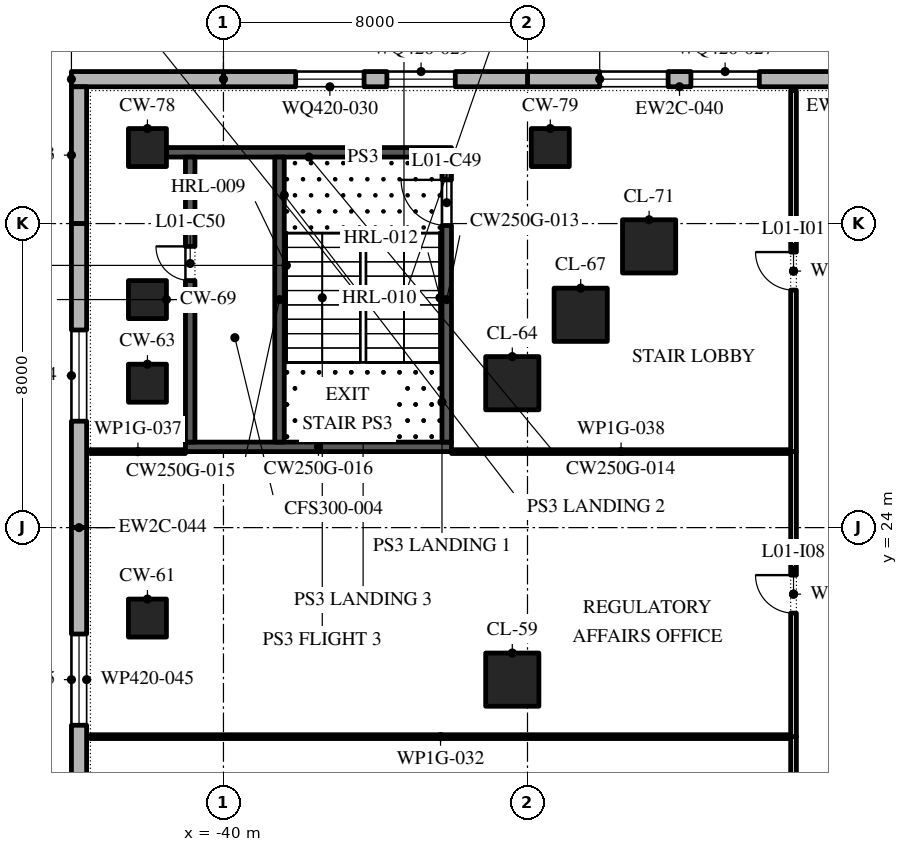
"""IFC4 building model, lengths in metres.
Left out: names, types, materials, properties, quantities, classifications, styles, units other than length and angle.
Written with IfcOpenShell. Run it as: python <this file> out.ifc"""

import sys

from ifc_helpers import new_model, si_unit, direction, frame, frame_2d, origin, origin_2d, place, context, subcontext, project, spatial, polyline, rectangle, outline, extrude, element, fill, save


model = new_model("IFC4")
c1 = context("Model", 3, precision=1e-05, world=origin(), true_north=direction((0.0, 1.0)))
c2 = subcontext(c1, "Body", "Model", "MODEL_VIEW")
j1 = project(units=[si_unit("LENGTHUNIT", "METRE"), si_unit("PLANEANGLEUNIT", "RADIAN")], contexts=[c1])
p1 = place(None, origin())
s1 = spatial("IfcSite", under=j1, at=p1, CompositionType="ELEMENT")
p2 = place(p1, origin())
s2 = spatial("IfcBuilding", under=s1, at=p2, CompositionType="ELEMENT")
p3 = place(p2, frame((0.0, 0.0, 8.0)))
s3 = spatial("IfcBuildingStorey", under=s2, at=p3, CompositionType="ELEMENT", Elevation=8.0)
p4 = place(p3, frame((-32.4, 20.0, 0.0), z_axis=(0.0, 0.0, 1.0), x_axis=(1.0, 0.0, 0.0)))
e1 = element("IfcColumn", 1, at=p4, inside=s3, PredefinedType="COLUMN", context=c2, shape_type="SweptSolid", body=[
    extrude(rectangle(XDim=1.4, YDim=1.4, at=origin_2d()), origin(), (0.0, 0.0, 1.0), 6.0),
])
for number, where, z_axis, x_axis in (
    (2, (-42.0, 21.62, 0.0), (0.0, 0.0, 1.0), (1.0, 0.0, 0.0)),
    (3, (-42.0, 27.8, 0.0), (0.0, 0.0, 1.0), (1.0, 0.0, 0.0)),
):
    element("IfcColumn", number, at=place(p3, frame(where, z_axis=z_axis, x_axis=x_axis)), inside=s3, PredefinedType="COLUMN", context=c2, shape_type="SweptSolid", body=[
        extrude(rectangle(XDim=1.0, YDim=1.0, at=origin_2d()), origin(), (0.0, 0.0, 1.0), 6.0),
    ])
for number, where, z_axis, x_axis in (
    (4, (-32.4, 27.8, 0.0), (0.0, 0.0, 1.0), (1.0, 0.0, 0.0)),
    (5, (-30.6, 29.6, 0.0), (0.0, 0.0, 1.0), (1.0, 0.0, 0.0)),
):
    element("IfcColumn", number, at=place(p3, frame(where, z_axis=z_axis, x_axis=x_axis)), inside=s3, PredefinedType="COLUMN", context=c2, shape_type="SweptSolid", body=[
        extrude(rectangle(XDim=1.4, YDim=1.4, at=origin_2d()), origin(), (0.0, 0.0, 1.0), 6.0),
    ])
p5 = place(p3, frame((-42.0, 30.0, 0.0), z_axis=(0.0, 0.0, 1.0), x_axis=(1.0, 0.0, 0.0)))
e6 = element("IfcColumn", 6, at=p5, inside=s3, PredefinedType="COLUMN", context=c2, shape_type="SweptSolid", body=[
    extrude(rectangle(XDim=1.0, YDim=1.0, at=origin_2d()), origin(), (0.0, 0.0, 1.0), 6.0),
])
p6 = place(p3, frame((-28.8, 31.4, 0.0), z_axis=(0.0, 0.0, 1.0), x_axis=(1.0, 0.0, 0.0)))
e7 = element("IfcColumn", 7, at=p6, inside=s3, PredefinedType="COLUMN", context=c2, shape_type="SweptSolid", body=[
    extrude(rectangle(XDim=1.4, YDim=1.4, at=origin_2d()), origin(), (0.0, 0.0, 1.0), 6.0),
])
for number, where, z_axis, x_axis in (
    (8, (-42.0, 34.0, 0.0), (0.0, 0.0, 1.0), (1.0, 0.0, 0.0)),
    (9, (-31.4, 34.0, 0.0), (0.0, 0.0, 1.0), (1.0, 0.0, 0.0)),
):
    element("IfcColumn", number, at=place(p3, frame(where, z_axis=z_axis, x_axis=x_axis)), inside=s3, PredefinedType="COLUMN", context=c2, shape_type="SweptSolid", body=[
        extrude(rectangle(XDim=1.0, YDim=1.0, at=origin_2d()), origin(), (0.0, 0.0, 1.0), 6.0),
    ])
p7 = place(p3, frame((-24.0, 35.8, 0.0), z_axis=(0.0, 0.0, 1.0), x_axis=(-1.0, 0.0, 0.0)))
e10 = element("IfcWall", 10, at=p7, inside=s3, PredefinedType="STANDARD", context=c2, shape_type="SweptSolid", body=[
    extrude(rectangle(XDim=8.0, YDim=0.4, at=frame_2d((4.0, 0.0))), origin(), (0.0, 0.0, 1.0), 5.7),
])
p8 = place(p7, frame((1.9, 0.0, 0.9)))
e11 = element("IfcOpeningElement", 11, at=p8, cuts=e10, PredefinedType="OPENING", context=c2, shape_type="SweptSolid", body=[
    extrude(outline(polyline([(0.0, 0.0), (1.8, 0.0), (1.8, 2.641), (1.785, 2.876), (1.739, 3.107), (1.663, 3.33), (1.559, 3.541), (1.428, 3.737), (1.273, 3.914), (1.096, 4.069), (0.9, 4.2), (0.704, 4.069), (0.527, 3.914), (0.372, 3.737), (0.241, 3.541), (0.137, 3.33), (0.061, 3.107), (0.015, 2.876), (0.0, 2.641), (0.0, 0.0)])), frame((0.0, 0.21, 0.0), z_axis=(0.0, -1.0, 0.0), x_axis=(1.0, 0.0, 0.0)), (0.0, 0.0, 1.0), 0.42),
])
p9 = place(p7, frame((4.3, 0.0, 0.9)))
e12 = element("IfcOpeningElement", 12, at=p9, cuts=e10, PredefinedType="OPENING", context=c2, shape_type="SweptSolid", body=[
    extrude(outline(polyline([(0.0, 0.0), (1.8, 0.0), (1.8, 2.641), (1.785, 2.876), (1.739, 3.107), (1.663, 3.33), (1.559, 3.541), (1.428, 3.737), (1.273, 3.914), (1.096, 4.069), (0.9, 4.2), (0.704, 4.069), (0.527, 3.914), (0.372, 3.737), (0.241, 3.541), (0.137, 3.33), (0.061, 3.107), (0.015, 2.876), (0.0, 2.641), (0.0, 0.0)])), frame((0.0, 0.21, 0.0), z_axis=(0.0, -1.0, 0.0), x_axis=(1.0, 0.0, 0.0)), (0.0, 0.0, 1.0), 0.42),
])
p10 = place(p3, frame((-32.0, 35.8, 0.0), z_axis=(0.0, 0.0, 1.0), x_axis=(-1.0, 0.0, 0.0)))
e13 = element("IfcWall", 13, at=p10, inside=s3, PredefinedType="STANDARD", context=c2, shape_type="SweptSolid", body=[
    extrude(rectangle(XDim=8.0, YDim=0.4, at=frame_2d((4.0, 0.0))), origin(), (0.0, 0.0, 1.0), 5.7),
])
p11 = place(p10, frame((1.9, 0.0, 0.9)))
e14 = element("IfcOpeningElement", 14, at=p11, cuts=e13, PredefinedType="OPENING", context=c2, shape_type="SweptSolid", body=[
    extrude(outline(polyline([(0.0, 0.0), (1.8, 0.0), (1.8, 2.641), (1.785, 2.876), (1.739, 3.107), (1.663, 3.33), (1.559, 3.541), (1.428, 3.737), (1.273, 3.914), (1.096, 4.069), (0.9, 4.2), (0.704, 4.069), (0.527, 3.914), (0.372, 3.737), (0.241, 3.541), (0.137, 3.33), (0.061, 3.107), (0.015, 2.876), (0.0, 2.641), (0.0, 0.0)])), frame((0.0, 0.21, 0.0), z_axis=(0.0, -1.0, 0.0), x_axis=(1.0, 0.0, 0.0)), (0.0, 0.0, 1.0), 0.42),
])
p12 = place(p10, frame((4.3, 0.0, 0.9)))
e15 = element("IfcOpeningElement", 15, at=p12, cuts=e13, PredefinedType="OPENING", context=c2, shape_type="SweptSolid", body=[
    extrude(outline(polyline([(0.0, 0.0), (1.8, 0.0), (1.8, 2.641), (1.785, 2.876), (1.739, 3.107), (1.663, 3.33), (1.559, 3.541), (1.428, 3.737), (1.273, 3.914), (1.096, 4.069), (0.9, 4.2), (0.704, 4.069), (0.527, 3.914), (0.372, 3.737), (0.241, 3.541), (0.137, 3.33), (0.061, 3.107), (0.015, 2.876), (0.0, 2.641), (0.0, 0.0)])), frame((0.0, 0.21, 0.0), z_axis=(0.0, -1.0, 0.0), x_axis=(1.0, 0.0, 0.0)), (0.0, 0.0, 1.0), 0.42),
])
p13 = place(p3, frame((-40.0, 35.8, 0.0), z_axis=(0.0, 0.0, 1.0), x_axis=(-1.0, 0.0, 0.0)))
e16 = element("IfcWall", 16, at=p13, inside=s3, PredefinedType="STANDARD", context=c2, shape_type="SweptSolid", body=[
    extrude(rectangle(XDim=4.0, YDim=0.4, at=frame_2d((2.0, 0.0))), origin(), (0.0, 0.0, 1.0), 5.7),
])
p14 = place(p3, frame((-43.8, 35.6, 0.0), z_axis=(0.0, 0.0, 1.0), x_axis=(0.0, -1.0, 0.0)))
e17 = element("IfcWall", 17, at=p14, inside=s3, PredefinedType="STANDARD", context=c2, shape_type="SweptSolid", body=[
    extrude(rectangle(XDim=3.6, YDim=0.4, at=frame_2d((1.8, 0.0))), origin(), (0.0, 0.0, 1.0), 5.7),
])
p15 = place(p3, frame((-43.8, 32.0, 0.0), z_axis=(0.0, 0.0, 1.0), x_axis=(0.0, -1.0, 0.0)))
e18 = element("IfcWall", 18, at=p15, inside=s3, PredefinedType="STANDARD", context=c2, shape_type="SweptSolid", body=[
    extrude(rectangle(XDim=8.0, YDim=0.4, at=frame_2d((4.0, 0.0))), origin(), (0.0, 0.0, 1.0), 5.7),
])
p16 = place(p15, frame((2.8, 0.0, 0.9)))
e19 = element("IfcOpeningElement", 19, at=p16, cuts=e18, PredefinedType="OPENING", context=c2, shape_type="SweptSolid", body=[
    extrude(outline(polyline([(0.0, 0.0), (2.4, 0.0), (2.4, 2.122), (2.379, 2.435), (2.318, 2.743), (2.217, 3.04), (2.078, 3.322), (1.904, 3.583), (1.697, 3.819), (1.461, 4.026), (1.2, 4.2), (0.939, 4.026), (0.703, 3.819), (0.496, 3.583), (0.322, 3.322), (0.183, 3.04), (0.082, 2.743), (0.021, 2.435), (0.0, 2.122), (0.0, 0.0)])), frame((0.0, 0.21, 0.0), z_axis=(0.0, -1.0, 0.0), x_axis=(1.0, 0.0, 0.0)), (0.0, 0.0, 1.0), 0.42),
])
p17 = place(p3, frame((-43.8, 24.0, 0.0), z_axis=(0.0, 0.0, 1.0), x_axis=(0.0, -1.0, 0.0)))
e20 = element("IfcWall", 20, at=p17, inside=s3, PredefinedType="STANDARD", context=c2, shape_type="SweptSolid", body=[
    extrude(rectangle(XDim=8.0, YDim=0.4, at=frame_2d((4.0, 0.0))), origin(), (0.0, 0.0, 1.0), 5.7),
])
p18 = place(p17, frame((2.8, 0.0, 0.9)))
e21 = element("IfcOpeningElement", 21, at=p18, cuts=e20, PredefinedType="OPENING", context=c2, shape_type="SweptSolid", body=[
    extrude(outline(polyline([(0.0, 0.0), (2.4, 0.0), (2.4, 2.122), (2.379, 2.435), (2.318, 2.743), (2.217, 3.04), (2.078, 3.322), (1.904, 3.583), (1.697, 3.819), (1.461, 4.026), (1.2, 4.2), (0.939, 4.026), (0.703, 3.819), (0.496, 3.583), (0.322, 3.322), (0.183, 3.04), (0.082, 2.743), (0.021, 2.435), (0.0, 2.122), (0.0, 0.0)])), frame((0.0, 0.21, 0.0), z_axis=(0.0, -1.0, 0.0), x_axis=(1.0, 0.0, 0.0)), (0.0, 0.0, 1.0), 0.42),
])
p19 = place(p3, frame((-41.0, 26.125, 0.0), z_axis=(0.0, 0.0, 1.0), x_axis=(1.0, 0.0, 0.0)))
e22 = element("IfcWall", 22, at=p19, inside=s3, PredefinedType="SHEAR", context=c2, shape_type="SweptSolid", body=[
    extrude(rectangle(XDim=7.0, YDim=0.25, at=frame_2d((3.5, 0.0))), origin(), (0.0, 0.0, 1.0), 5.7),
])
p20 = place(p3, frame((-41.5, 33.875, 0.0), z_axis=(0.0, 0.0, 1.0), x_axis=(1.0, 0.0, 0.0)))
e23 = element("IfcWall", 23, at=p20, inside=s3, PredefinedType="SHEAR", context=c2, shape_type="SweptSolid", body=[
    extrude(rectangle(XDim=7.5, YDim=0.25, at=frame_2d((3.75, 0.0))), origin(), (0.0, 0.0, 1.0), 5.7),
])
p21 = place(p3, frame((-40.875, 26.25, 0.0), z_axis=(0.0, 0.0, 1.0), x_axis=(0.0, 1.0, 0.0)))
e24 = element("IfcWall", 24, at=p21, inside=s3, PredefinedType="SHEAR", context=c2, shape_type="SweptSolid", body=[
    extrude(rectangle(XDim=7.5, YDim=0.25, at=frame_2d((3.75, 0.0))), origin(), (0.0, 0.0, 1.0), 5.7),
])
p22 = place(p21, frame((4.25, 0.0, 0.0)))
e25 = element("IfcOpeningElement", 25, at=p22, cuts=e24, PredefinedType="OPENING", context=c2, shape_type="SweptSolid", body=[
    extrude(rectangle(XDim=0.9, YDim=2.1, at=frame_2d((0.45, 1.05))), frame((0.0, 0.135, 0.0), z_axis=(0.0, -1.0, 0.0), x_axis=(1.0, 0.0, 0.0)), (0.0, 0.0, 1.0), 0.27),
])
p23 = place(p3, frame((-34.125, 26.25, 0.0), z_axis=(0.0, 0.0, 1.0), x_axis=(0.0, 1.0, 0.0)))
e26 = element("IfcWall", 26, at=p23, inside=s3, PredefinedType="SHEAR", context=c2, shape_type="SweptSolid", body=[
    extrude(rectangle(XDim=7.5, YDim=0.25, at=frame_2d((3.75, 0.0))), origin(), (0.0, 0.0, 1.0), 5.7),
])
p24 = place(p23, frame((5.7, 0.0, 0.0)))
e27 = element("IfcOpeningElement", 27, at=p24, cuts=e26, PredefinedType="OPENING", context=c2, shape_type="SweptSolid", body=[
    extrude(rectangle(XDim=1.2, YDim=2.1, at=frame_2d((0.6, 1.05))), frame((0.0, 0.135, 0.0), z_axis=(0.0, -1.0, 0.0), x_axis=(1.0, 0.0, 0.0)), (0.0, 0.0, 1.0), 0.27),
])
p25 = place(p3, frame((-38.525, 26.25, 0.0), z_axis=(0.0, 0.0, 1.0), x_axis=(0.0, 1.0, 0.0)))
e28 = element("IfcWall", 28, at=p25, inside=s3, PredefinedType="SHEAR", context=c2, shape_type="SweptSolid", body=[
    extrude(rectangle(XDim=7.5, YDim=0.25, at=frame_2d((3.75, 0.0))), origin(), (0.0, 0.0, 1.0), 5.7),
])
p26 = place(p3, frame((-43.5, 18.5, 0.0), z_axis=(0.0, 0.0, 1.0), x_axis=(1.0, 0.0, 0.0)))
e29 = element("IfcWall", 29, at=p26, inside=s3, PredefinedType="PARTITIONING", context=c2, shape_type="SweptSolid", body=[
    extrude(rectangle(XDim=18.425, YDim=0.1, at=frame_2d((9.212, 0.0))), origin(), (0.0, 0.0, 1.0), 5.7),
])
p27 = place(p3, frame((-43.5, 26.0, 0.0), z_axis=(0.0, 0.0, 1.0), x_axis=(1.0, 0.0, 0.0)))
e30 = element("IfcWall", 30, at=p27, inside=s3, PredefinedType="PARTITIONING", context=c2, shape_type="SweptSolid", body=[
    extrude(rectangle(XDim=2.5, YDim=0.1, at=frame_2d((1.25, 0.0))), origin(), (0.0, 0.0, 1.0), 5.7),
])
p28 = place(p3, frame((-34.0, 26.0, 0.0), z_axis=(0.0, 0.0, 1.0), x_axis=(1.0, 0.0, 0.0)))
e31 = element("IfcWall", 31, at=p28, inside=s3, PredefinedType="PARTITIONING", context=c2, shape_type="SweptSolid", body=[
    extrude(rectangle(XDim=8.925, YDim=0.1, at=frame_2d((4.462, 0.0))), origin(), (0.0, 0.0, 1.0), 5.7),
])
p29 = place(p3, frame((-25.0, 9.5, 0.0), z_axis=(0.0, 0.0, 1.0), x_axis=(0.0, 1.0, 0.0)))
e32 = element("IfcWall", 32, at=p29, inside=s3, PredefinedType="PARTITIONING", context=c2, shape_type="SweptSolid", body=[
    extrude(rectangle(XDim=9.0, YDim=0.15, at=frame_2d((4.5, 0.0))), origin(), (0.0, 0.0, 1.0), 5.7),
])
p30 = place(p29, frame((3.6, 0.0, 0.0)))
e33 = element("IfcOpeningElement", 33, at=p30, cuts=e32, PredefinedType="OPENING", context=c2, shape_type="SweptSolid", body=[
    extrude(rectangle(XDim=1.8, YDim=2.1, at=frame_2d((0.9, 1.05))), frame((0.0, 0.085, 0.0), z_axis=(0.0, -1.0, 0.0), x_axis=(1.0, 0.0, 0.0)), (0.0, 0.0, 1.0), 0.17),
])
p31 = place(p3, frame((-25.0, 18.5, 0.0), z_axis=(0.0, 0.0, 1.0), x_axis=(0.0, 1.0, 0.0)))
e34 = element("IfcWall", 34, at=p31, inside=s3, PredefinedType="PARTITIONING", context=c2, shape_type="SweptSolid", body=[
    extrude(rectangle(XDim=7.5, YDim=0.15, at=frame_2d((3.75, 0.0))), origin(), (0.0, 0.0, 1.0), 5.7),
])
p32 = place(p31, frame((3.25, 0.0, 0.0)))
e35 = element("IfcOpeningElement", 35, at=p32, cuts=e34, PredefinedType="OPENING", context=c2, shape_type="SweptSolid", body=[
    extrude(rectangle(XDim=1.0, YDim=2.1, at=frame_2d((0.5, 1.05))), frame((0.0, 0.085, 0.0), z_axis=(0.0, -1.0, 0.0), x_axis=(1.0, 0.0, 0.0)), (0.0, 0.0, 1.0), 0.17),
])
p33 = place(p3, frame((-25.0, 26.0, 0.0), z_axis=(0.0, 0.0, 1.0), x_axis=(0.0, 1.0, 0.0)))
e36 = element("IfcWall", 36, at=p33, inside=s3, PredefinedType="PARTITIONING", context=c2, shape_type="SweptSolid", body=[
    extrude(rectangle(XDim=9.5, YDim=0.15, at=frame_2d((4.75, 0.0))), origin(), (0.0, 0.0, 1.0), 5.7),
])
p34 = place(p33, frame((4.25, 0.0, 0.0)))
e37 = element("IfcOpeningElement", 37, at=p34, cuts=e36, PredefinedType="OPENING", context=c2, shape_type="SweptSolid", body=[
    extrude(rectangle(XDim=1.0, YDim=2.1, at=frame_2d((0.5, 1.05))), frame((0.0, 0.085, 0.0), z_axis=(0.0, -1.0, 0.0), x_axis=(1.0, 0.0, 0.0)), (0.0, 0.0, 1.0), 0.17),
])
p35 = place(p8, origin())
e38 = element("IfcWindow", 38, at=p35, inside=s3, PartitioningType="DOUBLE_PANEL_VERTICAL", PredefinedType="WINDOW", context=c2, shape_type="SweptSolid", body=[
    extrude(outline(polyline([(0.0, 0.0), (1.8, 0.0), (1.8, 2.641), (1.785, 2.876), (1.739, 3.107), (1.663, 3.33), (1.559, 3.541), (1.428, 3.737), (1.273, 3.914), (1.096, 4.069), (0.9, 4.2), (0.704, 4.069), (0.527, 3.914), (0.372, 3.737), (0.241, 3.541), (0.137, 3.33), (0.061, 3.107), (0.015, 2.876), (0.0, 2.641), (0.0, 0.0)])), frame((0.0, 0.03, 0.0), z_axis=(0.0, -1.0, 0.0), x_axis=(1.0, 0.0, 0.0)), (0.0, 0.0, 1.0), 0.06),
])
fill(e11, e38)
p36 = place(p9, origin())
e39 = element("IfcWindow", 39, at=p36, inside=s3, PartitioningType="DOUBLE_PANEL_VERTICAL", PredefinedType="WINDOW", context=c2, shape_type="SweptSolid", body=[
    extrude(outline(polyline([(0.0, 0.0), (1.8, 0.0), (1.8, 2.641), (1.785, 2.876), (1.739, 3.107), (1.663, 3.33), (1.559, 3.541), (1.428, 3.737), (1.273, 3.914), (1.096, 4.069), (0.9, 4.2), (0.704, 4.069), (0.527, 3.914), (0.372, 3.737), (0.241, 3.541), (0.137, 3.33), (0.061, 3.107), (0.015, 2.876), (0.0, 2.641), (0.0, 0.0)])), frame((0.0, 0.03, 0.0), z_axis=(0.0, -1.0, 0.0), x_axis=(1.0, 0.0, 0.0)), (0.0, 0.0, 1.0), 0.06),
])
fill(e12, e39)
p37 = place(p11, origin())
e40 = element("IfcWindow", 40, at=p37, inside=s3, PartitioningType="DOUBLE_PANEL_VERTICAL", PredefinedType="WINDOW", context=c2, shape_type="SweptSolid", body=[
    extrude(outline(polyline([(0.0, 0.0), (1.8, 0.0), (1.8, 2.641), (1.785, 2.876), (1.739, 3.107), (1.663, 3.33), (1.559, 3.541), (1.428, 3.737), (1.273, 3.914), (1.096, 4.069), (0.9, 4.2), (0.704, 4.069), (0.527, 3.914), (0.372, 3.737), (0.241, 3.541), (0.137, 3.33), (0.061, 3.107), (0.015, 2.876), (0.0, 2.641), (0.0, 0.0)])), frame((0.0, 0.03, 0.0), z_axis=(0.0, -1.0, 0.0), x_axis=(1.0, 0.0, 0.0)), (0.0, 0.0, 1.0), 0.06),
])
fill(e14, e40)
p38 = place(p12, origin())
e41 = element("IfcWindow", 41, at=p38, inside=s3, PartitioningType="DOUBLE_PANEL_VERTICAL", PredefinedType="WINDOW", context=c2, shape_type="SweptSolid", body=[
    extrude(outline(polyline([(0.0, 0.0), (1.8, 0.0), (1.8, 2.641), (1.785, 2.876), (1.739, 3.107), (1.663, 3.33), (1.559, 3.541), (1.428, 3.737), (1.273, 3.914), (1.096, 4.069), (0.9, 4.2), (0.704, 4.069), (0.527, 3.914), (0.372, 3.737), (0.241, 3.541), (0.137, 3.33), (0.061, 3.107), (0.015, 2.876), (0.0, 2.641), (0.0, 0.0)])), frame((0.0, 0.03, 0.0), z_axis=(0.0, -1.0, 0.0), x_axis=(1.0, 0.0, 0.0)), (0.0, 0.0, 1.0), 0.06),
])
fill(e15, e41)
p39 = place(p16, origin())
e42 = element("IfcWindow", 42, at=p39, inside=s3, PartitioningType="DOUBLE_PANEL_VERTICAL", PredefinedType="WINDOW", context=c2, shape_type="SweptSolid", body=[
    extrude(outline(polyline([(0.0, 0.0), (2.4, 0.0), (2.4, 2.122), (2.379, 2.435), (2.318, 2.743), (2.217, 3.04), (2.078, 3.322), (1.904, 3.583), (1.697, 3.819), (1.461, 4.026), (1.2, 4.2), (0.939, 4.026), (0.703, 3.819), (0.496, 3.583), (0.322, 3.322), (0.183, 3.04), (0.082, 2.743), (0.021, 2.435), (0.0, 2.122), (0.0, 0.0)])), frame((0.0, 0.03, 0.0), z_axis=(0.0, -1.0, 0.0), x_axis=(1.0, 0.0, 0.0)), (0.0, 0.0, 1.0), 0.06),
])
fill(e19, e42)
p40 = place(p18, origin())
e43 = element("IfcWindow", 43, at=p40, inside=s3, PartitioningType="DOUBLE_PANEL_VERTICAL", PredefinedType="WINDOW", context=c2, shape_type="SweptSolid", body=[
    extrude(outline(polyline([(0.0, 0.0), (2.4, 0.0), (2.4, 2.122), (2.379, 2.435), (2.318, 2.743), (2.217, 3.04), (2.078, 3.322), (1.904, 3.583), (1.697, 3.819), (1.461, 4.026), (1.2, 4.2), (0.939, 4.026), (0.703, 3.819), (0.496, 3.583), (0.322, 3.322), (0.183, 3.04), (0.082, 2.743), (0.021, 2.435), (0.0, 2.122), (0.0, 0.0)])), frame((0.0, 0.03, 0.0), z_axis=(0.0, -1.0, 0.0), x_axis=(1.0, 0.0, 0.0)), (0.0, 0.0, 1.0), 0.06),
])
fill(e21, e43)
p41 = place(p24, origin())
e44 = element("IfcDoor", 44, at=p41, inside=s3, OperationType="SINGLE_SWING_LEFT", PredefinedType="DOOR", context=c2, shape_type="SweptSolid", body=[
    extrude(rectangle(XDim=1.2, YDim=2.1, at=frame_2d((0.6, 1.05))), frame((0.0, 0.025, 0.0), z_axis=(0.0, -1.0, 0.0), x_axis=(1.0, 0.0, 0.0)), (0.0, 0.0, 1.0), 0.05),
])
fill(e27, e44)
p42 = place(p22, origin())
e45 = element("IfcDoor", 45, at=p42, inside=s3, OperationType="SINGLE_SWING_LEFT", PredefinedType="DOOR", context=c2, shape_type="SweptSolid", body=[
    extrude(rectangle(XDim=0.9, YDim=2.1, at=frame_2d((0.45, 1.05))), frame((0.0, -0.075, 0.0), z_axis=(0.0, -1.0, 0.0), x_axis=(1.0, 0.0, 0.0)), (0.0, 0.0, 1.0), 0.05),
])
fill(e25, e45)
p43 = place(p34, origin())
e46 = element("IfcDoor", 46, at=p43, inside=s3, OperationType="SINGLE_SWING_LEFT", PredefinedType="DOOR", context=c2, shape_type="SweptSolid", body=[
    extrude(rectangle(XDim=1.0, YDim=2.1, at=frame_2d((0.5, 1.05))), frame((0.0, 0.025, 0.0), z_axis=(0.0, -1.0, 0.0), x_axis=(1.0, 0.0, 0.0)), (0.0, 0.0, 1.0), 0.05),
])
fill(e37, e46)
p44 = place(p32, origin())
e47 = element("IfcDoor", 47, at=p44, inside=s3, OperationType="SINGLE_SWING_LEFT", PredefinedType="DOOR", context=c2, shape_type="SweptSolid", body=[
    extrude(rectangle(XDim=1.0, YDim=2.1, at=frame_2d((0.5, 1.05))), frame((0.0, 0.025, 0.0), z_axis=(0.0, -1.0, 0.0), x_axis=(1.0, 0.0, 0.0)), (0.0, 0.0, 1.0), 0.05),
])
fill(e35, e47)
save(model, sys.argv[1])
